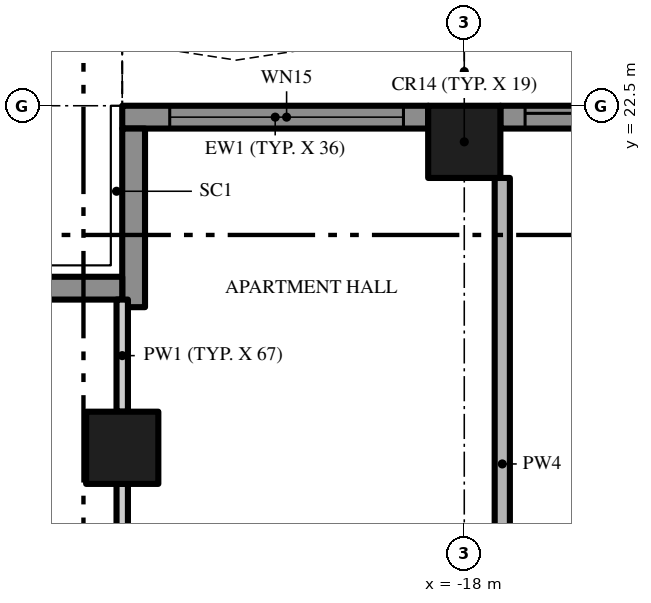
"""IFC4 building model, lengths in metres.
Left out: names, types, materials, properties, quantities, classifications, styles, units other than length and angle.
Written with IfcOpenShell. Run it as: python <this file> out.ifc"""

import sys

from ifc_helpers import new_model, si_unit, direction, frame, frame_2d, origin, origin_2d, place, context, subcontext, project, spatial, polyline, rectangle, outline, extrude, element, fill, save


model = new_model("IFC4")
c1 = context("Model", 3, precision=1e-05, world=origin(), true_north=direction((0.0, 1.0)))
c2 = subcontext(c1, "Body", "Model", "MODEL_VIEW")
j1 = project(units=[si_unit("LENGTHUNIT", "METRE"), si_unit("PLANEANGLEUNIT", "RADIAN")], contexts=[c1])
p1 = place(None, origin())
s1 = spatial("IfcSite", under=j1, at=p1, CompositionType="ELEMENT")
p2 = place(p1, origin())
s2 = spatial("IfcBuilding", under=s1, at=p2, CompositionType="ELEMENT")
p3 = place(p2, frame((0.0, 0.0, 218.6)))
s3 = spatial("IfcBuildingStorey", under=s2, at=p3, CompositionType="ELEMENT", Elevation=218.6)
for number, where, z_axis, x_axis in (
    (1, (-18.0, 22.025, 0.0), (0.0, 0.0, 1.0), (1.0, 0.0, 0.0)),
    (2, (-22.5, 18.0, 0.0), (0.0, 0.0, 1.0), (1.0, 0.0, 0.0)),
):
    element("IfcColumn", number, at=place(p3, frame(where, z_axis=z_axis, x_axis=x_axis)), inside=s3, PredefinedType="COLUMN", context=c2, shape_type="SweptSolid", body=[
        extrude(rectangle(XDim=0.95, YDim=0.95, at=origin_2d()), origin(), (0.0, 0.0, 1.0), 3.5),
    ])
p4 = place(p3, frame((-17.525, 22.35, 0.0), z_axis=(0.0, 0.0, 1.0), x_axis=(1.0, 0.0, 0.0)))
e3 = element("IfcWall", 3, at=p4, inside=s3, PredefinedType="SOLIDWALL", context=c2, shape_type="SweptSolid", body=[
    extrude(rectangle(XDim=4.025, YDim=0.3, at=frame_2d((2.013, 0.0))), origin(), (0.0, 0.0, 1.0), 3.5),
])
p5 = place(p4, frame((0.325, 0.0, 0.0)))
e4 = element("IfcOpeningElement", 4, at=p5, cuts=e3, PredefinedType="OPENING", context=c2, shape_type="SweptSolid", body=[
    extrude(rectangle(XDim=3.075, YDim=2.4, at=frame_2d((1.538, 1.2))), frame((0.0, 0.16, 0.0), z_axis=(0.0, -1.0, 0.0), x_axis=(1.0, 0.0, 0.0)), (0.0, 0.0, 1.0), 0.32),
])
p6 = place(p3, frame((-22.5, 22.35, 0.0), z_axis=(0.0, 0.0, 1.0), x_axis=(1.0, 0.0, 0.0)))
e5 = element("IfcWall", 5, at=p6, inside=s3, PredefinedType="SOLIDWALL", context=c2, shape_type="SweptSolid", body=[
    extrude(rectangle(XDim=4.025, YDim=0.3, at=frame_2d((2.013, 0.0))), origin(), (0.0, 0.0, 1.0), 3.5),
])
p7 = place(p6, frame((0.625, 0.0, 0.45)))
e6 = element("IfcOpeningElement", 6, at=p7, cuts=e5, PredefinedType="OPENING", context=c2, shape_type="SweptSolid", body=[
    extrude(rectangle(XDim=3.075, YDim=2.65, at=frame_2d((1.538, 1.325))), frame((0.0, 0.16, 0.0), z_axis=(0.0, -1.0, 0.0), x_axis=(1.0, 0.0, 0.0)), (0.0, 0.0, 1.0), 0.32),
])
p8 = place(p3, frame((-22.35, 19.85, 0.0), z_axis=(0.0, 0.0, 1.0), x_axis=(0.0, 1.0, 0.0)))
e7 = element("IfcWall", 7, at=p8, inside=s3, PredefinedType="SOLIDWALL", context=c2, shape_type="SweptSolid", body=[
    extrude(rectangle(XDim=2.35, YDim=0.3, at=frame_2d((1.175, 0.0))), origin(), (0.0, 0.0, 1.0), 3.5),
])
p9 = place(p3, frame((-24.75, 20.1, 0.0), z_axis=(0.0, 0.0, 1.0), x_axis=(1.0, 0.0, 0.0)))
e8 = element("IfcWall", 8, at=p9, inside=s3, PredefinedType="SOLIDWALL", context=c2, shape_type="SweptSolid", body=[
    extrude(rectangle(XDim=2.25, YDim=0.3, at=frame_2d((1.125, 0.0))), origin(), (0.0, 0.0, 1.0), 3.5),
])
p10 = place(p3, origin())
e9 = element("IfcWall", 9, at=p10, inside=s3, PredefinedType="USERDEFINED", context=c2, shape_type="SweptSolid", body=[
    extrude(outline(polyline([(-13.5, 25.5), (-15.0, 25.271), (-16.5, 24.671), (-18.0, 23.929), (-19.5, 23.329), (-21.0, 23.1), (-22.5, 23.329), (-22.538, 23.082), (-21.0, 22.847), (-19.434, 23.086), (-17.898, 23.701), (-16.398, 24.442), (-14.934, 25.028), (-13.462, 25.253), (-13.5, 25.5)])), origin(), (0.0, 0.0, 1.0), 0.9),
])
p11 = place(p3, frame((-22.5, 0.1, 0.0), z_axis=(0.0, 0.0, 1.0), x_axis=(0.0, 1.0, 0.0)))
e10 = element("IfcWall", 10, at=p11, inside=s3, PredefinedType="PARTITIONING", context=c2, shape_type="SweptSolid", body=[
    extrude(rectangle(XDim=17.425, YDim=0.15, at=frame_2d((8.713, 0.0))), origin(), (0.0, 0.0, 1.0), 3.5),
])
p12 = place(p11, frame((1.65, 0.0, 0.0)))
e11 = element("IfcOpeningElement", 11, at=p12, cuts=e10, PredefinedType="OPENING", context=c2, shape_type="SweptSolid", body=[
    extrude(rectangle(XDim=1.0, YDim=2.4, at=frame_2d((0.5, 1.2))), frame((0.0, 0.085, 0.0), z_axis=(0.0, -1.0, 0.0), x_axis=(1.0, 0.0, 0.0)), (0.0, 0.0, 1.0), 0.17),
])
p13 = place(p11, frame((7.25, 0.0, 0.0)))
e12 = element("IfcOpeningElement", 12, at=p13, cuts=e10, PredefinedType="OPENING", context=c2, shape_type="SweptSolid", body=[
    extrude(rectangle(XDim=1.0, YDim=2.4, at=frame_2d((0.5, 1.2))), frame((0.0, 0.085, 0.0), z_axis=(0.0, -1.0, 0.0), x_axis=(1.0, 0.0, 0.0)), (0.0, 0.0, 1.0), 0.17),
])
p14 = place(p11, frame((11.4, 0.0, 0.0)))
e13 = element("IfcOpeningElement", 13, at=p14, cuts=e10, PredefinedType="OPENING", context=c2, shape_type="SweptSolid", body=[
    extrude(rectangle(XDim=1.8, YDim=2.4, at=frame_2d((0.9, 1.2))), frame((0.0, 0.085, 0.0), z_axis=(0.0, -1.0, 0.0), x_axis=(1.0, 0.0, 0.0)), (0.0, 0.0, 1.0), 0.17),
])
p15 = place(p3, frame((-22.5, 18.475, 0.0), z_axis=(0.0, 0.0, 1.0), x_axis=(0.0, 1.0, 0.0)))
e14 = element("IfcWall", 14, at=p15, inside=s3, PredefinedType="PARTITIONING", context=c2, shape_type="SweptSolid", body=[
    extrude(rectangle(XDim=1.475, YDim=0.15, at=frame_2d((0.738, 0.0))), origin(), (0.0, 0.0, 1.0), 3.5),
])
p16 = place(p3, frame((-17.5, 14.025, 0.0), z_axis=(0.0, 0.0, 1.0), x_axis=(0.0, 1.0, 0.0)))
e15 = element("IfcWall", 15, at=p16, inside=s3, PredefinedType="PARTITIONING", context=c2, shape_type="SweptSolid", body=[
    extrude(rectangle(XDim=7.525, YDim=0.2, at=frame_2d((3.763, 0.0))), origin(), (0.0, 0.0, 1.0), 3.5),
])
p17 = place(p16, frame((1.1, 0.0, 0.0)))
e16 = element("IfcOpeningElement", 16, at=p17, cuts=e15, PredefinedType="OPENING", context=c2, shape_type="SweptSolid", body=[
    extrude(rectangle(XDim=1.2, YDim=2.4, at=frame_2d((0.6, 1.2))), frame((0.0, 0.11, 0.0), z_axis=(0.0, -1.0, 0.0), x_axis=(1.0, 0.0, 0.0)), (0.0, 0.0, 1.0), 0.22),
])
p18 = place(p5, origin())
e17 = element("IfcDoor", 17, at=p18, inside=s3, OperationType="SINGLE_SWING_LEFT", PredefinedType="DOOR", context=c2, shape_type="SweptSolid", body=[
    extrude(rectangle(XDim=3.075, YDim=2.4, at=frame_2d((1.538, 1.2))), frame((0.0, 0.025, 0.0), z_axis=(0.0, -1.0, 0.0), x_axis=(1.0, 0.0, 0.0)), (0.0, 0.0, 1.0), 0.05),
])
fill(e4, e17)
p19 = place(p7, origin())
e18 = element("IfcWindow", 18, at=p19, inside=s3, PartitioningType="SINGLE_PANEL", PredefinedType="WINDOW", context=c2, shape_type="SweptSolid", body=[
    extrude(rectangle(XDim=3.075, YDim=2.65, at=frame_2d((1.538, 1.325))), frame((0.0, 0.03, 0.0), z_axis=(0.0, -1.0, 0.0), x_axis=(1.0, 0.0, 0.0)), (0.0, 0.0, 1.0), 0.06),
])
fill(e6, e18)
save(model, sys.argv[1])
